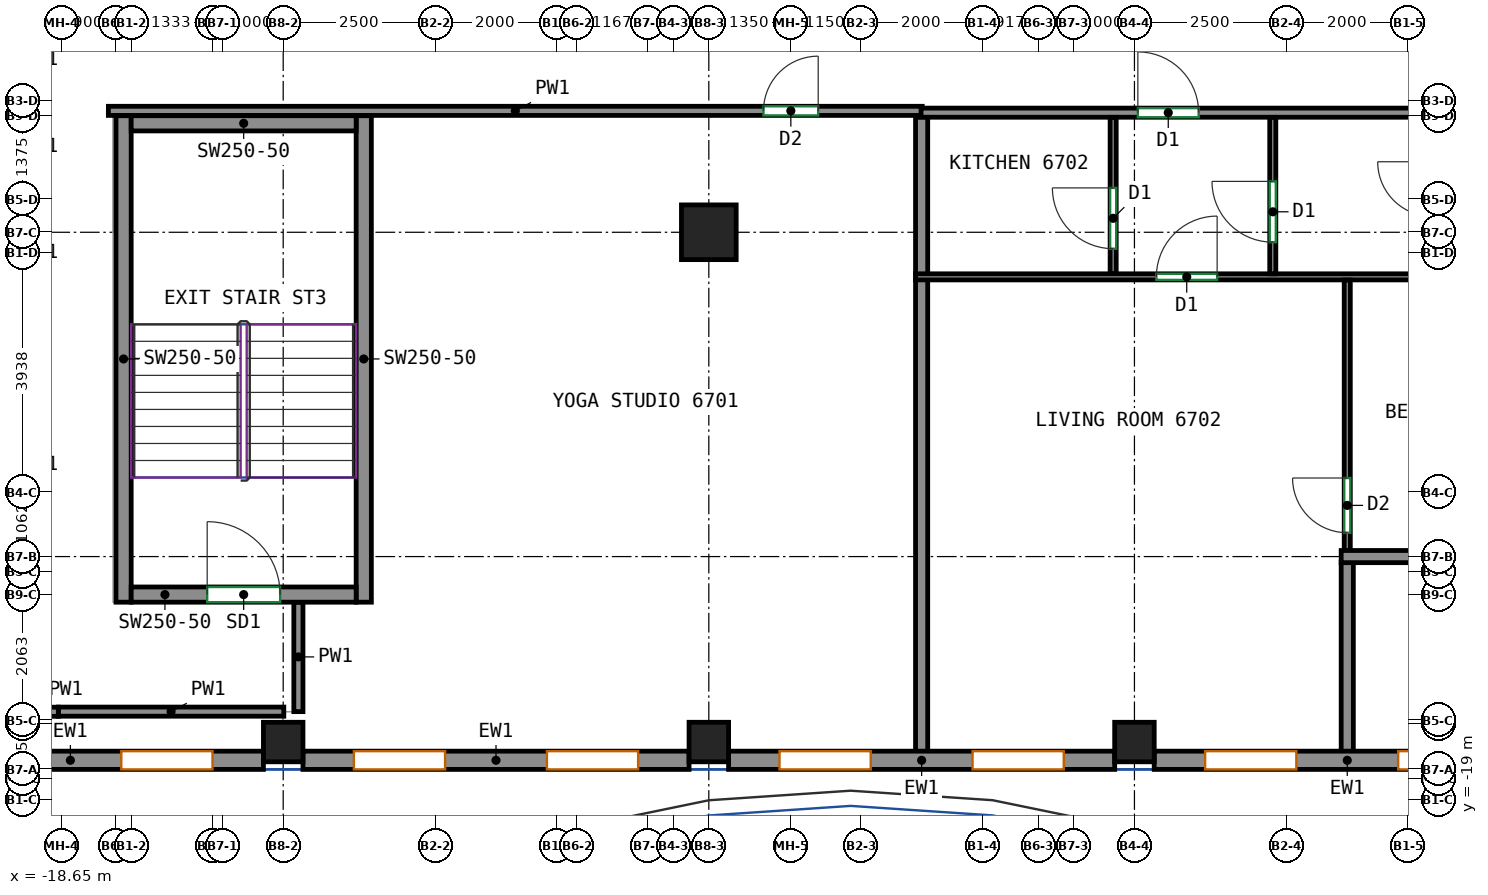
"""IFC4 building model, lengths in metres.
Left out: names, types, materials, properties, quantities, classifications, styles, units other than length and angle.
Written with IfcOpenShell. Run it as: python <this file> out.ifc"""

import sys

from ifc_helpers import new_model, si_unit, direction, frame, frame_2d, origin, origin_2d, place, context, subcontext, project, spatial, rectangle, extrude, source, transform, mapped, element, fill, save


model = new_model("IFC4")
c1 = context("Model", 3, precision=1e-05, world=origin(), true_north=direction((0.0, 1.0)))
c2 = subcontext(c1, "Body", "Model", "MODEL_VIEW")
j1 = project(units=[si_unit("LENGTHUNIT", "METRE"), si_unit("PLANEANGLEUNIT", "RADIAN")], contexts=[c1])
p1 = place(None, origin())
s1 = spatial("IfcSite", under=j1, at=p1, CompositionType="ELEMENT")
p2 = place(p1, origin())
s2 = spatial("IfcBuilding", under=s1, at=p2, CompositionType="ELEMENT")
p3 = place(p2, frame((0.0, 0.0, 273.8)))
s3 = spatial("IfcBuildingStorey", under=s2, at=p3, CompositionType="ELEMENT", Elevation=273.8)
m1 = source(origin(), c2, "Body", "SweptSolid", [
    extrude(rectangle(XDim=0.65, YDim=0.65, at=origin_2d()), origin(), (0.0, 0.0, 1.0), 3.12),
])
for number, where, z_axis, x_axis in (
    (1, (-15.0, -18.05, 0.0), (0.0, 0.0, 1.0), (1.0, 0.0, 0.0)),
    (2, (-8.0, -18.05, 0.0), (0.0, 0.0, 1.0), (1.0, 0.0, 0.0)),
):
    element("IfcColumn", number, at=place(p3, frame(where, z_axis=z_axis, x_axis=x_axis)), inside=s3, PredefinedType="COLUMN", context=c2, shape_type="MappedRepresentation", body=[
        mapped(m1, transform((0.0, 0.0, 0.0))),
    ])
m2 = source(origin(), c2, "Body", "SweptSolid", [
    extrude(rectangle(XDim=0.9, YDim=0.9, at=origin_2d()), origin(), (0.0, 0.0, 1.0), 3.12),
])
p4 = place(p3, frame((-8.0, -9.667, 0.0), z_axis=(0.0, 0.0, 1.0), x_axis=(1.0, 0.0, 0.0)))
e3 = element("IfcColumn", 3, at=p4, inside=s3, PredefinedType="COLUMN", context=c2, shape_type="MappedRepresentation", body=[
    mapped(m2, transform((0.0, 0.0, 0.0))),
])
p5 = place(p3, frame((-1.0, -18.05, 0.0), z_axis=(0.0, 0.0, 1.0), x_axis=(1.0, 0.0, 0.0)))
e4 = element("IfcColumn", 4, at=p5, inside=s3, PredefinedType="COLUMN", context=c2, shape_type="MappedRepresentation", body=[
    mapped(m1, transform((0.0, 0.0, 0.0))),
])
m3 = source(origin(), c2, "Body", "SweptSolid", [
    extrude(rectangle(XDim=8.0, YDim=0.25, at=frame_2d((4.0, 0.0))), origin(), (0.0, 0.0, 1.0), 3.12),
])
for number, where, z_axis, x_axis in (
    (5, (-17.625, -15.75, 0.0), (0.0, 0.0, 1.0), (0.0, 1.0, 0.0)),
    (6, (-13.675, -15.75, 0.0), (0.0, 0.0, 1.0), (0.0, 1.0, 0.0)),
):
    element("IfcWall", number, at=place(p3, frame(where, z_axis=z_axis, x_axis=x_axis)), inside=s3, PredefinedType="SHEAR", context=c2, shape_type="MappedRepresentation", body=[
        mapped(m3, transform((0.0, 0.0, 0.0))),
    ])
m4 = source(origin(), c2, "Body", "SweptSolid", [
    extrude(rectangle(XDim=3.7, YDim=0.25, at=frame_2d((1.85, 0.0))), origin(), (0.0, 0.0, 1.0), 3.12),
])
p6 = place(p3, frame((-17.5, -15.625, 0.0), z_axis=(0.0, 0.0, 1.0), x_axis=(1.0, 0.0, 0.0)))
e7 = element("IfcWall", 7, at=p6, inside=s3, PredefinedType="SHEAR", context=c2, shape_type="MappedRepresentation", body=[
    mapped(m4, transform((0.0, 0.0, 0.0))),
])
p7 = place(p6, frame((1.25, 0.0, 0.0)))
e8 = element("IfcOpeningElement", 8, at=p7, cuts=e7, PredefinedType="OPENING", context=c2, shape_type="SweptSolid", body=[
    extrude(rectangle(XDim=1.2, YDim=2.1, at=frame_2d((0.6, 1.05))), frame((0.0, 0.135, 0.0), z_axis=(0.0, -1.0, 0.0), x_axis=(1.0, 0.0, 0.0)), (0.0, 0.0, 1.0), 0.27),
])
p8 = place(p3, frame((-17.5, -7.875, 0.0), z_axis=(0.0, 0.0, 1.0), x_axis=(1.0, 0.0, 0.0)))
e9 = element("IfcWall", 9, at=p8, inside=s3, PredefinedType="SHEAR", context=c2, shape_type="MappedRepresentation", body=[
    mapped(m4, transform((0.0, 0.0, 0.0))),
])
m5 = source(origin(), c2, "Body", "SweptSolid", [
    extrude(rectangle(XDim=6.35, YDim=0.3, at=frame_2d((3.175, 0.0))), origin(), (0.0, 0.0, 1.0), 3.12),
])
p9 = place(p3, frame((-21.675, -18.35, 0.0), z_axis=(0.0, 0.0, 1.0), x_axis=(1.0, 0.0, 0.0)))
e10 = element("IfcWall", 10, at=p9, inside=s3, PredefinedType="SOLIDWALL", context=c2, shape_type="MappedRepresentation", body=[
    mapped(m5, transform((0.0, 0.0, 0.0))),
])
p10 = place(p9, frame((0.837, 0.0, 0.8)))
e11 = element("IfcOpeningElement", 11, at=p10, cuts=e10, PredefinedType="OPENING", context=c2, shape_type="SweptSolid", body=[
    extrude(rectangle(XDim=1.5, YDim=2.05, at=frame_2d((0.75, 1.025))), frame((0.0, 0.16, 0.0), z_axis=(0.0, -1.0, 0.0), x_axis=(1.0, 0.0, 0.0)), (0.0, 0.0, 1.0), 0.32),
])
p11 = place(p9, frame((4.012, 0.0, 0.8)))
e12 = element("IfcOpeningElement", 12, at=p11, cuts=e10, PredefinedType="OPENING", context=c2, shape_type="SweptSolid", body=[
    extrude(rectangle(XDim=1.5, YDim=2.05, at=frame_2d((0.75, 1.025))), frame((0.0, 0.16, 0.0), z_axis=(0.0, -1.0, 0.0), x_axis=(1.0, 0.0, 0.0)), (0.0, 0.0, 1.0), 0.32),
])
p12 = place(p3, frame((-14.675, -18.35, 0.0), z_axis=(0.0, 0.0, 1.0), x_axis=(1.0, 0.0, 0.0)))
e13 = element("IfcWall", 13, at=p12, inside=s3, PredefinedType="SOLIDWALL", context=c2, shape_type="MappedRepresentation", body=[
    mapped(m5, transform((0.0, 0.0, 0.0))),
])
p13 = place(p12, frame((0.837, 0.0, 0.8)))
e14 = element("IfcOpeningElement", 14, at=p13, cuts=e13, PredefinedType="OPENING", context=c2, shape_type="SweptSolid", body=[
    extrude(rectangle(XDim=1.5, YDim=2.05, at=frame_2d((0.75, 1.025))), frame((0.0, 0.16, 0.0), z_axis=(0.0, -1.0, 0.0), x_axis=(1.0, 0.0, 0.0)), (0.0, 0.0, 1.0), 0.32),
])
p14 = place(p12, frame((4.012, 0.0, 0.8)))
e15 = element("IfcOpeningElement", 15, at=p14, cuts=e13, PredefinedType="OPENING", context=c2, shape_type="SweptSolid", body=[
    extrude(rectangle(XDim=1.5, YDim=2.05, at=frame_2d((0.75, 1.025))), frame((0.0, 0.16, 0.0), z_axis=(0.0, -1.0, 0.0), x_axis=(1.0, 0.0, 0.0)), (0.0, 0.0, 1.0), 0.32),
])
p15 = place(p3, frame((-7.675, -18.35, 0.0), z_axis=(0.0, 0.0, 1.0), x_axis=(1.0, 0.0, 0.0)))
e16 = element("IfcWall", 16, at=p15, inside=s3, PredefinedType="SOLIDWALL", context=c2, shape_type="MappedRepresentation", body=[
    mapped(m5, transform((0.0, 0.0, 0.0))),
])
p16 = place(p15, frame((0.837, 0.0, 0.8)))
e17 = element("IfcOpeningElement", 17, at=p16, cuts=e16, PredefinedType="OPENING", context=c2, shape_type="SweptSolid", body=[
    extrude(rectangle(XDim=1.5, YDim=2.05, at=frame_2d((0.75, 1.025))), frame((0.0, 0.16, 0.0), z_axis=(0.0, -1.0, 0.0), x_axis=(1.0, 0.0, 0.0)), (0.0, 0.0, 1.0), 0.32),
])
p17 = place(p15, frame((4.012, 0.0, 0.8)))
e18 = element("IfcOpeningElement", 18, at=p17, cuts=e16, PredefinedType="OPENING", context=c2, shape_type="SweptSolid", body=[
    extrude(rectangle(XDim=1.5, YDim=2.05, at=frame_2d((0.75, 1.025))), frame((0.0, 0.16, 0.0), z_axis=(0.0, -1.0, 0.0), x_axis=(1.0, 0.0, 0.0)), (0.0, 0.0, 1.0), 0.32),
])
p18 = place(p3, frame((-0.675, -18.35, 0.0), z_axis=(0.0, 0.0, 1.0), x_axis=(1.0, 0.0, 0.0)))
e19 = element("IfcWall", 19, at=p18, inside=s3, PredefinedType="SOLIDWALL", context=c2, shape_type="MappedRepresentation", body=[
    mapped(m5, transform((0.0, 0.0, 0.0))),
])
p19 = place(p18, frame((0.837, 0.0, 0.8)))
e20 = element("IfcOpeningElement", 20, at=p19, cuts=e19, PredefinedType="OPENING", context=c2, shape_type="SweptSolid", body=[
    extrude(rectangle(XDim=1.5, YDim=2.05, at=frame_2d((0.75, 1.025))), frame((0.0, 0.16, 0.0), z_axis=(0.0, -1.0, 0.0), x_axis=(1.0, 0.0, 0.0)), (0.0, 0.0, 1.0), 0.32),
])
p20 = place(p18, frame((4.012, 0.0, 0.8)))
e21 = element("IfcOpeningElement", 21, at=p20, cuts=e19, PredefinedType="OPENING", context=c2, shape_type="SweptSolid", body=[
    extrude(rectangle(XDim=1.5, YDim=2.05, at=frame_2d((0.75, 1.025))), frame((0.0, 0.16, 0.0), z_axis=(0.0, -1.0, 0.0), x_axis=(1.0, 0.0, 0.0)), (0.0, 0.0, 1.0), 0.32),
])
p21 = place(p3, frame((-17.875, -7.67, 0.0), z_axis=(0.0, 0.0, 1.0), x_axis=(1.0, 0.0, 0.0)))
e22 = element("IfcWall", 22, at=p21, inside=s3, PredefinedType="PARTITIONING", context=c2, shape_type="SweptSolid", body=[
    extrude(rectangle(XDim=13.385, YDim=0.15, at=frame_2d((6.692, 0.0))), origin(), (0.0, 0.0, 1.0), 3.12),
])
p22 = place(p21, frame((10.774, 0.0, 0.0)))
e23 = element("IfcOpeningElement", 23, at=p22, cuts=e22, PredefinedType="OPENING", context=c2, shape_type="SweptSolid", body=[
    extrude(rectangle(XDim=0.9, YDim=2.1, at=frame_2d((0.45, 1.05))), frame((0.0, 0.085, 0.0), z_axis=(0.0, -1.0, 0.0), x_axis=(1.0, 0.0, 0.0)), (0.0, 0.0, 1.0), 0.17),
])
p23 = place(p3, frame((-14.75, -17.55, 0.0), z_axis=(0.0, 0.0, 1.0), x_axis=(0.0, 1.0, 0.0)))
e24 = element("IfcWall", 24, at=p23, inside=s3, PredefinedType="PARTITIONING", context=c2, shape_type="SweptSolid", body=[
    extrude(rectangle(XDim=1.8, YDim=0.15, at=frame_2d((0.9, 0.0))), origin(), (0.0, 0.0, 1.0), 3.12),
])
p24 = place(p3, frame((-18.698, -17.55, 0.0), z_axis=(0.0, 0.0, 1.0), x_axis=(1.0, 0.0, 0.0)))
e25 = element("IfcWall", 25, at=p24, inside=s3, PredefinedType="PARTITIONING", context=c2, shape_type="SweptSolid", body=[
    extrude(rectangle(XDim=3.708, YDim=0.15, at=frame_2d((1.854, 0.0))), origin(), (0.0, 0.0, 1.0), 3.12),
])
p25 = place(p3, frame((-19.677, -17.552, 0.0), z_axis=(0.0, 0.0, 1.0), x_axis=(1.0, 0.0, 0.0)))
e26 = element("IfcWall", 26, at=p25, inside=s3, PredefinedType="PARTITIONING", context=c2, shape_type="SweptSolid", body=[
    extrude(rectangle(XDim=0.979, YDim=0.15, at=frame_2d((0.49, 0.0))), origin(), (0.0, 0.0, 1.0), 3.12),
])
p26 = place(p3, frame((-4.51, -7.7, 0.0), z_axis=(0.0, 0.0, 1.0), x_axis=(1.0, 0.0, 0.0)))
e27 = element("IfcWall", 27, at=p26, inside=s3, PredefinedType="PARTITIONING", context=c2, shape_type="SweptSolid", body=[
    extrude(rectangle(XDim=19.76, YDim=0.15, at=frame_2d((9.88, 0.0))), origin(), (0.0, 0.0, 1.0), 3.12),
])
p27 = place(p26, frame((3.566, 0.0, 0.0)))
e28 = element("IfcOpeningElement", 28, at=p27, cuts=e27, PredefinedType="OPENING", context=c2, shape_type="SweptSolid", body=[
    extrude(rectangle(XDim=1.0, YDim=2.1, at=frame_2d((0.5, 1.05))), frame((0.0, 0.085, 0.0), z_axis=(0.0, -1.0, 0.0), x_axis=(1.0, 0.0, 0.0)), (0.0, 0.0, 1.0), 0.17),
])
p28 = place(p26, frame((16.08, 0.0, 0.0)))
e29 = element("IfcOpeningElement", 29, at=p28, cuts=e27, PredefinedType="OPENING", context=c2, shape_type="SweptSolid", body=[
    extrude(rectangle(XDim=1.0, YDim=2.1, at=frame_2d((0.5, 1.05))), frame((0.0, 0.085, 0.0), z_axis=(0.0, -1.0, 0.0), x_axis=(1.0, 0.0, 0.0)), (0.0, 0.0, 1.0), 0.17),
])
p29 = place(p3, frame((-4.5, -10.36, 0.0), z_axis=(0.0, 0.0, 1.0), x_axis=(0.0, 1.0, 0.0)))
e30 = element("IfcWall", 30, at=p29, inside=s3, PredefinedType="PARTITIONING", context=c2, shape_type="SweptSolid", body=[
    extrude(rectangle(XDim=2.583, YDim=0.2, at=frame_2d((1.292, 0.0))), origin(), (0.0, 0.0, 1.0), 3.12),
])
p30 = place(p3, frame((-4.5, -18.25, 0.0), z_axis=(0.0, 0.0, 1.0), x_axis=(0.0, 1.0, 0.0)))
e31 = element("IfcWall", 31, at=p30, inside=s3, PredefinedType="PARTITIONING", context=c2, shape_type="SweptSolid", body=[
    extrude(rectangle(XDim=7.808, YDim=0.2, at=frame_2d((3.904, 0.0))), origin(), (0.0, 0.0, 1.0), 3.12),
])
p31 = place(p3, frame((-1.35, -10.35, 0.0), z_axis=(0.0, 0.0, 1.0), x_axis=(0.0, 1.0, 0.0)))
e32 = element("IfcWall", 32, at=p31, inside=s3, PredefinedType="PARTITIONING", context=c2, shape_type="SweptSolid", body=[
    extrude(rectangle(XDim=2.573, YDim=0.1, at=frame_2d((1.287, 0.0))), origin(), (0.0, 0.0, 1.0), 3.12),
])
p32 = place(p31, frame((0.413, 0.0, 0.0)))
e33 = element("IfcOpeningElement", 33, at=p32, cuts=e32, PredefinedType="OPENING", context=c2, shape_type="SweptSolid", body=[
    extrude(rectangle(XDim=1.0, YDim=2.1, at=frame_2d((0.5, 1.05))), frame((0.0, 0.06, 0.0), z_axis=(0.0, -1.0, 0.0), x_axis=(1.0, 0.0, 0.0)), (0.0, 0.0, 1.0), 0.12),
])
p33 = place(p3, frame((-4.6, -10.4, 0.0), z_axis=(0.0, 0.0, 1.0), x_axis=(1.0, 0.0, 0.0)))
e34 = element("IfcWall", 34, at=p33, inside=s3, PredefinedType="PARTITIONING", context=c2, shape_type="SweptSolid", body=[
    extrude(rectangle(XDim=22.35, YDim=0.1, at=frame_2d((11.175, 0.0))), origin(), (0.0, 0.0, 1.0), 3.12),
])
p34 = place(p33, frame((3.96, 0.0, 0.0)))
e35 = element("IfcOpeningElement", 35, at=p34, cuts=e34, PredefinedType="OPENING", context=c2, shape_type="SweptSolid", body=[
    extrude(rectangle(XDim=1.0, YDim=2.1, at=frame_2d((0.5, 1.05))), frame((0.0, 0.06, 0.0), z_axis=(0.0, -1.0, 0.0), x_axis=(1.0, 0.0, 0.0)), (0.0, 0.0, 1.0), 0.12),
])
p35 = place(p33, frame((15.666, 0.0, 0.0)))
e36 = element("IfcOpeningElement", 36, at=p35, cuts=e34, PredefinedType="OPENING", context=c2, shape_type="SweptSolid", body=[
    extrude(rectangle(XDim=1.0, YDim=2.1, at=frame_2d((0.5, 1.05))), frame((0.0, 0.06, 0.0), z_axis=(0.0, -1.0, 0.0), x_axis=(1.0, 0.0, 0.0)), (0.0, 0.0, 1.0), 0.12),
])
p36 = place(p33, frame((18.109, 0.0, 0.0)))
e37 = element("IfcOpeningElement", 37, at=p36, cuts=e34, PredefinedType="OPENING", context=c2, shape_type="SweptSolid", body=[
    extrude(rectangle(XDim=1.0, YDim=2.1, at=frame_2d((0.5, 1.05))), frame((0.0, 0.06, 0.0), z_axis=(0.0, -1.0, 0.0), x_axis=(1.0, 0.0, 0.0)), (0.0, 0.0, 1.0), 0.12),
])
p37 = place(p3, frame((1.275, -10.35, 0.0), z_axis=(0.0, 0.0, 1.0), x_axis=(0.0, 1.0, 0.0)))
e38 = element("IfcWall", 38, at=p37, inside=s3, PredefinedType="PARTITIONING", context=c2, shape_type="SweptSolid", body=[
    extrude(rectangle(XDim=2.573, YDim=0.1, at=frame_2d((1.287, 0.0))), origin(), (0.0, 0.0, 1.0), 3.12),
])
p38 = place(p37, frame((0.52, 0.0, 0.0)))
e39 = element("IfcOpeningElement", 39, at=p38, cuts=e38, PredefinedType="OPENING", context=c2, shape_type="SweptSolid", body=[
    extrude(rectangle(XDim=1.0, YDim=2.1, at=frame_2d((0.5, 1.05))), frame((0.0, 0.06, 0.0), z_axis=(0.0, -1.0, 0.0), x_axis=(1.0, 0.0, 0.0)), (0.0, 0.0, 1.0), 0.12),
])
p39 = place(p3, frame((2.5, -14.91, 0.0), z_axis=(0.0, 0.0, 1.0), x_axis=(0.0, 1.0, 0.0)))
e40 = element("IfcWall", 40, at=p39, inside=s3, PredefinedType="PARTITIONING", context=c2, shape_type="SweptSolid", body=[
    extrude(rectangle(XDim=4.458, YDim=0.1, at=frame_2d((2.229, 0.0))), origin(), (0.0, 0.0, 1.0), 3.12),
])
p40 = place(p39, frame((0.302, 0.0, 0.0)))
e41 = element("IfcOpeningElement", 41, at=p40, cuts=e40, PredefinedType="OPENING", context=c2, shape_type="SweptSolid", body=[
    extrude(rectangle(XDim=0.9, YDim=2.1, at=frame_2d((0.45, 1.05))), frame((0.0, 0.06, 0.0), z_axis=(0.0, -1.0, 0.0), x_axis=(1.0, 0.0, 0.0)), (0.0, 0.0, 1.0), 0.12),
])
p41 = place(p3, frame((2.5, -18.25, 0.0), z_axis=(0.0, 0.0, 1.0), x_axis=(0.0, 1.0, 0.0)))
e42 = element("IfcWall", 42, at=p41, inside=s3, PredefinedType="PARTITIONING", context=c2, shape_type="SweptSolid", body=[
    extrude(rectangle(XDim=3.16, YDim=0.2, at=frame_2d((1.58, 0.0))), origin(), (0.0, 0.0, 1.0), 3.12),
])
p42 = place(p3, frame((2.4, -15.0, 0.0), z_axis=(0.0, 0.0, 1.0), x_axis=(1.0, 0.0, 0.0)))
e43 = element("IfcWall", 43, at=p42, inside=s3, PredefinedType="PARTITIONING", context=c2, shape_type="SweptSolid", body=[
    extrude(rectangle(XDim=3.7, YDim=0.2, at=frame_2d((1.85, 0.0))), origin(), (0.0, 0.0, 1.0), 3.12),
])
p43 = place(p11, origin())
e44 = element("IfcWindow", 44, at=p43, inside=s3, PartitioningType="SINGLE_PANEL", PredefinedType="WINDOW", context=c2, shape_type="SweptSolid", body=[
    extrude(rectangle(XDim=1.5, YDim=2.05, at=frame_2d((0.75, 1.025))), frame((0.0, 0.03, 0.0), z_axis=(0.0, -1.0, 0.0), x_axis=(1.0, 0.0, 0.0)), (0.0, 0.0, 1.0), 0.06),
])
fill(e12, e44)
p44 = place(p13, origin())
e45 = element("IfcWindow", 45, at=p44, inside=s3, PartitioningType="SINGLE_PANEL", PredefinedType="WINDOW", context=c2, shape_type="SweptSolid", body=[
    extrude(rectangle(XDim=1.5, YDim=2.05, at=frame_2d((0.75, 1.025))), frame((0.0, 0.03, 0.0), z_axis=(0.0, -1.0, 0.0), x_axis=(1.0, 0.0, 0.0)), (0.0, 0.0, 1.0), 0.06),
])
fill(e14, e45)
p45 = place(p14, origin())
e46 = element("IfcWindow", 46, at=p45, inside=s3, PartitioningType="SINGLE_PANEL", PredefinedType="WINDOW", context=c2, shape_type="SweptSolid", body=[
    extrude(rectangle(XDim=1.5, YDim=2.05, at=frame_2d((0.75, 1.025))), frame((0.0, 0.03, 0.0), z_axis=(0.0, -1.0, 0.0), x_axis=(1.0, 0.0, 0.0)), (0.0, 0.0, 1.0), 0.06),
])
fill(e15, e46)
p46 = place(p16, origin())
e47 = element("IfcWindow", 47, at=p46, inside=s3, PartitioningType="SINGLE_PANEL", PredefinedType="WINDOW", context=c2, shape_type="SweptSolid", body=[
    extrude(rectangle(XDim=1.5, YDim=2.05, at=frame_2d((0.75, 1.025))), frame((0.0, 0.03, 0.0), z_axis=(0.0, -1.0, 0.0), x_axis=(1.0, 0.0, 0.0)), (0.0, 0.0, 1.0), 0.06),
])
fill(e17, e47)
p47 = place(p17, origin())
e48 = element("IfcWindow", 48, at=p47, inside=s3, PartitioningType="SINGLE_PANEL", PredefinedType="WINDOW", context=c2, shape_type="SweptSolid", body=[
    extrude(rectangle(XDim=1.5, YDim=2.05, at=frame_2d((0.75, 1.025))), frame((0.0, 0.03, 0.0), z_axis=(0.0, -1.0, 0.0), x_axis=(1.0, 0.0, 0.0)), (0.0, 0.0, 1.0), 0.06),
])
fill(e18, e48)
p48 = place(p19, origin())
e49 = element("IfcWindow", 49, at=p48, inside=s3, PartitioningType="SINGLE_PANEL", PredefinedType="WINDOW", context=c2, shape_type="SweptSolid", body=[
    extrude(rectangle(XDim=1.5, YDim=2.05, at=frame_2d((0.75, 1.025))), frame((0.0, 0.03, 0.0), z_axis=(0.0, -1.0, 0.0), x_axis=(1.0, 0.0, 0.0)), (0.0, 0.0, 1.0), 0.06),
])
fill(e20, e49)
p49 = place(p20, origin())
e50 = element("IfcWindow", 50, at=p49, inside=s3, PartitioningType="SINGLE_PANEL", PredefinedType="WINDOW", context=c2, shape_type="SweptSolid", body=[
    extrude(rectangle(XDim=1.5, YDim=2.05, at=frame_2d((0.75, 1.025))), frame((0.0, 0.03, 0.0), z_axis=(0.0, -1.0, 0.0), x_axis=(1.0, 0.0, 0.0)), (0.0, 0.0, 1.0), 0.06),
])
fill(e21, e50)
p50 = place(p7, origin())
e51 = element("IfcDoor", 51, at=p50, inside=s3, OperationType="DOUBLE_DOOR_SINGLE_SWING", PredefinedType="DOOR", context=c2, shape_type="SweptSolid", body=[
    extrude(rectangle(XDim=1.2, YDim=2.1, at=frame_2d((0.6, 1.05))), frame((0.0, 0.025, 0.0), z_axis=(0.0, -1.0, 0.0), x_axis=(1.0, 0.0, 0.0)), (0.0, 0.0, 1.0), 0.05),
])
fill(e8, e51)
p51 = place(p40, origin())
e52 = element("IfcDoor", 52, at=p51, inside=s3, OperationType="SINGLE_SWING_RIGHT", PredefinedType="DOOR", context=c2, shape_type="SweptSolid", body=[
    extrude(rectangle(XDim=0.9, YDim=2.1, at=frame_2d((0.45, 1.05))), frame((0.0, 0.025, 0.0), z_axis=(0.0, -1.0, 0.0), x_axis=(1.0, 0.0, 0.0)), (0.0, 0.0, 1.0), 0.05),
])
fill(e41, e52)
p52 = place(p34, origin())
e53 = element("IfcDoor", 53, at=p52, inside=s3, OperationType="SINGLE_SWING_RIGHT", PredefinedType="DOOR", context=c2, shape_type="SweptSolid", body=[
    extrude(rectangle(XDim=1.0, YDim=2.1, at=frame_2d((0.5, 1.05))), frame((0.0, 0.025, 0.0), z_axis=(0.0, -1.0, 0.0), x_axis=(1.0, 0.0, 0.0)), (0.0, 0.0, 1.0), 0.05),
])
fill(e35, e53)
p53 = place(p32, origin())
e54 = element("IfcDoor", 54, at=p53, inside=s3, OperationType="SINGLE_SWING_RIGHT", PredefinedType="DOOR", context=c2, shape_type="SweptSolid", body=[
    extrude(rectangle(XDim=1.0, YDim=2.1, at=frame_2d((0.5, 1.05))), frame((0.0, 0.025, 0.0), z_axis=(0.0, -1.0, 0.0), x_axis=(1.0, 0.0, 0.0)), (0.0, 0.0, 1.0), 0.05),
])
fill(e33, e54)
p54 = place(p38, origin())
e55 = element("IfcDoor", 55, at=p54, inside=s3, OperationType="SINGLE_SWING_RIGHT", PredefinedType="DOOR", context=c2, shape_type="SweptSolid", body=[
    extrude(rectangle(XDim=1.0, YDim=2.1, at=frame_2d((0.5, 1.05))), frame((0.0, 0.025, 0.0), z_axis=(0.0, -1.0, 0.0), x_axis=(1.0, 0.0, 0.0)), (0.0, 0.0, 1.0), 0.05),
])
fill(e39, e55)
p55 = place(p27, origin())
e56 = element("IfcDoor", 56, at=p55, inside=s3, OperationType="SINGLE_SWING_LEFT", PredefinedType="DOOR", context=c2, shape_type="SweptSolid", body=[
    extrude(rectangle(XDim=1.0, YDim=2.1, at=frame_2d((0.5, 1.05))), frame((0.0, 0.025, 0.0), z_axis=(0.0, -1.0, 0.0), x_axis=(1.0, 0.0, 0.0)), (0.0, 0.0, 1.0), 0.05),
])
fill(e28, e56)
p56 = place(p22, origin())
e57 = element("IfcDoor", 57, at=p56, inside=s3, OperationType="SINGLE_SWING_RIGHT", PredefinedType="DOOR", context=c2, shape_type="SweptSolid", body=[
    extrude(rectangle(XDim=0.9, YDim=2.1, at=frame_2d((0.45, 1.05))), frame((0.0, 0.025, 0.0), z_axis=(0.0, -1.0, 0.0), x_axis=(1.0, 0.0, 0.0)), (0.0, 0.0, 1.0), 0.05),
])
fill(e23, e57)
save(model, sys.argv[1])
